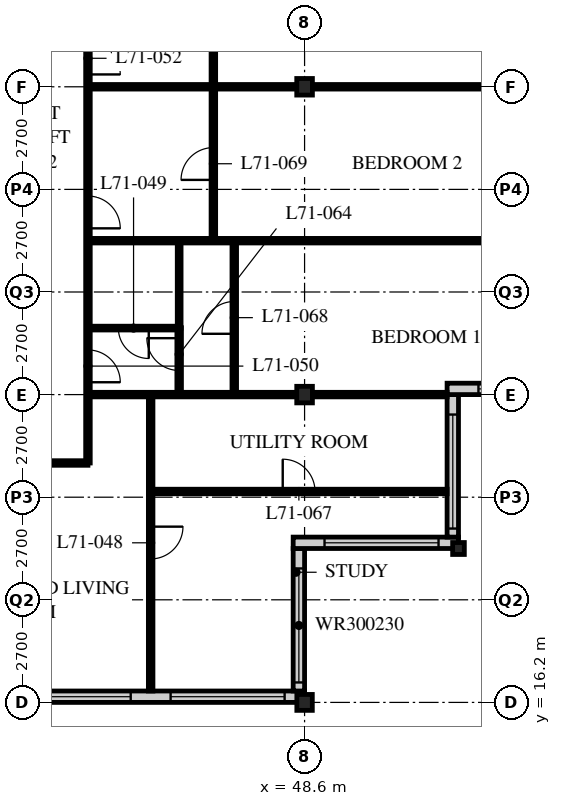
"""IFC4 building model, lengths in metres.
Left out: names, types, materials, properties, quantities, classifications, styles, units other than length and angle.
Written with IfcOpenShell. Run it as: python <this file> out.ifc"""

import sys

from ifc_helpers import new_model, si_unit, direction, frame, frame_2d, origin, origin_2d, place, context, subcontext, project, spatial, rectangle, i_section, extrude, element, fill, save


model = new_model("IFC4")
c1 = context("Model", 3, precision=1e-05, world=origin(), true_north=direction((0.0, 1.0)))
c2 = subcontext(c1, "Body", "Model", "MODEL_VIEW")
j1 = project(units=[si_unit("LENGTHUNIT", "METRE"), si_unit("PLANEANGLEUNIT", "RADIAN")], contexts=[c1])
p1 = place(None, origin())
s1 = spatial("IfcSite", under=j1, at=p1, CompositionType="ELEMENT")
p2 = place(p1, origin())
s2 = spatial("IfcBuilding", under=s1, at=p2, CompositionType="ELEMENT")
p3 = place(p2, frame((0.0, 0.0, 277.5)))
s3 = spatial("IfcBuildingStorey", under=s2, at=p3, CompositionType="ELEMENT", Elevation=277.5)
p4 = place(p3, frame((48.6, 16.2, 0.0), z_axis=(0.0, 0.0, 1.0), x_axis=(1.0, 0.0, 0.0)))
e1 = element("IfcColumn", 1, at=p4, inside=s3, PredefinedType="COLUMN", context=c2, shape_type="SweptSolid", body=[
    extrude(i_section(OverallWidth=0.407, OverallDepth=0.419, WebThickness=0.031, FlangeThickness=0.049, FilletRadius=0.015, at=origin_2d()), origin(), (0.0, 0.0, 1.0), 3.9),
])
for number, where, z_axis, x_axis in (
    (2, (48.6, 24.3, 0.0), (0.0, 0.0, 1.0), (1.0, 0.0, 0.0)),
    (3, (48.6, 32.4, 0.0), (0.0, 0.0, 1.0), (1.0, 0.0, 0.0)),
):
    element("IfcColumn", number, at=place(p3, frame(where, z_axis=z_axis, x_axis=x_axis)), inside=s3, PredefinedType="COLUMN", context=c2, shape_type="SweptSolid", body=[
        extrude(i_section(OverallWidth=0.412, OverallDepth=0.437, WebThickness=0.036, FlangeThickness=0.058, FilletRadius=0.015, at=origin_2d()), origin(), (0.0, 0.0, 1.0), 3.9),
    ])
p5 = place(p3, frame((52.65, 20.25, 0.0), z_axis=(0.0, 0.0, 1.0), x_axis=(1.0, 0.0, 0.0)))
e4 = element("IfcColumn", 4, at=p5, inside=s3, PredefinedType="COLUMN", context=c2, shape_type="SweptSolid", body=[
    extrude(i_section(OverallWidth=0.307, OverallDepth=0.314, WebThickness=0.012, FlangeThickness=0.019, FilletRadius=0.015, at=origin_2d()), origin(), (0.0, 0.0, 1.0), 3.9),
])
p6 = place(p3, frame((8.4, 16.35, 0.0), z_axis=(0.0, 0.0, 1.0), x_axis=(1.0, 0.0, 0.0)))
e5 = element("IfcWall", 5, at=p6, inside=s3, PredefinedType="SOLIDWALL", context=c2, shape_type="SweptSolid", body=[
    extrude(rectangle(XDim=40.2, YDim=0.3, at=frame_2d((20.1, 0.0))), origin(), (0.0, 0.0, 1.0), 3.69),
])
p7 = place(p6, frame((0.225, 0.0, 0.6)))
e6 = element("IfcOpeningElement", 6, at=p7, cuts=e5, PredefinedType="OPENING", context=c2, shape_type="SweptSolid", body=[
    extrude(rectangle(XDim=3.0, YDim=2.4, at=frame_2d((1.5, 1.2))), frame((0.0, 0.16, 0.0), z_axis=(0.0, -1.0, 0.0), x_axis=(1.0, 0.0, 0.0)), (0.0, 0.0, 1.0), 0.32),
])
p8 = place(p6, frame((4.275, 0.0, 0.6)))
e7 = element("IfcOpeningElement", 7, at=p8, cuts=e5, PredefinedType="OPENING", context=c2, shape_type="SweptSolid", body=[
    extrude(rectangle(XDim=3.0, YDim=2.4, at=frame_2d((1.5, 1.2))), frame((0.0, 0.16, 0.0), z_axis=(0.0, -1.0, 0.0), x_axis=(1.0, 0.0, 0.0)), (0.0, 0.0, 1.0), 0.32),
])
p9 = place(p6, frame((8.325, 0.0, 0.6)))
e8 = element("IfcOpeningElement", 8, at=p9, cuts=e5, PredefinedType="OPENING", context=c2, shape_type="SweptSolid", body=[
    extrude(rectangle(XDim=3.0, YDim=2.4, at=frame_2d((1.5, 1.2))), frame((0.0, 0.16, 0.0), z_axis=(0.0, -1.0, 0.0), x_axis=(1.0, 0.0, 0.0)), (0.0, 0.0, 1.0), 0.32),
])
p10 = place(p6, frame((12.375, 0.0, 0.6)))
e9 = element("IfcOpeningElement", 9, at=p10, cuts=e5, PredefinedType="OPENING", context=c2, shape_type="SweptSolid", body=[
    extrude(rectangle(XDim=3.0, YDim=2.4, at=frame_2d((1.5, 1.2))), frame((0.0, 0.16, 0.0), z_axis=(0.0, -1.0, 0.0), x_axis=(1.0, 0.0, 0.0)), (0.0, 0.0, 1.0), 0.32),
])
p11 = place(p6, frame((16.425, 0.0, 0.6)))
e10 = element("IfcOpeningElement", 10, at=p11, cuts=e5, PredefinedType="OPENING", context=c2, shape_type="SweptSolid", body=[
    extrude(rectangle(XDim=3.0, YDim=2.4, at=frame_2d((1.5, 1.2))), frame((0.0, 0.16, 0.0), z_axis=(0.0, -1.0, 0.0), x_axis=(1.0, 0.0, 0.0)), (0.0, 0.0, 1.0), 0.32),
])
p12 = place(p6, frame((20.475, 0.0, 0.6)))
e11 = element("IfcOpeningElement", 11, at=p12, cuts=e5, PredefinedType="OPENING", context=c2, shape_type="SweptSolid", body=[
    extrude(rectangle(XDim=3.0, YDim=2.4, at=frame_2d((1.5, 1.2))), frame((0.0, 0.16, 0.0), z_axis=(0.0, -1.0, 0.0), x_axis=(1.0, 0.0, 0.0)), (0.0, 0.0, 1.0), 0.32),
])
p13 = place(p6, frame((24.525, 0.0, 0.6)))
e12 = element("IfcOpeningElement", 12, at=p13, cuts=e5, PredefinedType="OPENING", context=c2, shape_type="SweptSolid", body=[
    extrude(rectangle(XDim=3.0, YDim=2.4, at=frame_2d((1.5, 1.2))), frame((0.0, 0.16, 0.0), z_axis=(0.0, -1.0, 0.0), x_axis=(1.0, 0.0, 0.0)), (0.0, 0.0, 1.0), 0.32),
])
p14 = place(p6, frame((28.575, 0.0, 0.6)))
e13 = element("IfcOpeningElement", 13, at=p14, cuts=e5, PredefinedType="OPENING", context=c2, shape_type="SweptSolid", body=[
    extrude(rectangle(XDim=3.0, YDim=2.4, at=frame_2d((1.5, 1.2))), frame((0.0, 0.16, 0.0), z_axis=(0.0, -1.0, 0.0), x_axis=(1.0, 0.0, 0.0)), (0.0, 0.0, 1.0), 0.32),
])
p15 = place(p6, frame((32.625, 0.0, 0.6)))
e14 = element("IfcOpeningElement", 14, at=p15, cuts=e5, PredefinedType="OPENING", context=c2, shape_type="SweptSolid", body=[
    extrude(rectangle(XDim=3.0, YDim=2.4, at=frame_2d((1.5, 1.2))), frame((0.0, 0.16, 0.0), z_axis=(0.0, -1.0, 0.0), x_axis=(1.0, 0.0, 0.0)), (0.0, 0.0, 1.0), 0.32),
])
p16 = place(p6, frame((36.675, 0.0, 0.6)))
e15 = element("IfcOpeningElement", 15, at=p16, cuts=e5, PredefinedType="OPENING", context=c2, shape_type="SweptSolid", body=[
    extrude(rectangle(XDim=3.0, YDim=2.4, at=frame_2d((1.5, 1.2))), frame((0.0, 0.16, 0.0), z_axis=(0.0, -1.0, 0.0), x_axis=(1.0, 0.0, 0.0)), (0.0, 0.0, 1.0), 0.32),
])
p17 = place(p3, frame((48.45, 16.5, 0.0), z_axis=(0.0, 0.0, 1.0), x_axis=(0.0, 1.0, 0.0)))
e16 = element("IfcWall", 16, at=p17, inside=s3, PredefinedType="SOLIDWALL", context=c2, shape_type="SweptSolid", body=[
    extrude(rectangle(XDim=3.75, YDim=0.3, at=frame_2d((1.875, 0.0))), origin(), (0.0, 0.0, 1.0), 3.69),
])
p18 = place(p17, frame((0.225, 0.0, 0.6)))
e17 = element("IfcOpeningElement", 17, at=p18, cuts=e16, PredefinedType="OPENING", context=c2, shape_type="SweptSolid", body=[
    extrude(rectangle(XDim=3.0, YDim=2.3, at=frame_2d((1.5, 1.15))), frame((0.0, 0.16, 0.0), z_axis=(0.0, -1.0, 0.0), x_axis=(1.0, 0.0, 0.0)), (0.0, 0.0, 1.0), 0.32),
])
p19 = place(p3, frame((48.3, 20.4, 0.0), z_axis=(0.0, 0.0, 1.0), x_axis=(1.0, 0.0, 0.0)))
e18 = element("IfcWall", 18, at=p19, inside=s3, PredefinedType="SOLIDWALL", context=c2, shape_type="SweptSolid", body=[
    extrude(rectangle(XDim=4.35, YDim=0.3, at=frame_2d((2.175, 0.0))), origin(), (0.0, 0.0, 1.0), 3.69),
])
p20 = place(p19, frame((0.825, 0.0, 0.6)))
e19 = element("IfcOpeningElement", 19, at=p20, cuts=e18, PredefinedType="OPENING", context=c2, shape_type="SweptSolid", body=[
    extrude(rectangle(XDim=3.0, YDim=2.3, at=frame_2d((1.5, 1.15))), frame((0.0, 0.16, 0.0), z_axis=(0.0, -1.0, 0.0), x_axis=(1.0, 0.0, 0.0)), (0.0, 0.0, 1.0), 0.32),
])
p21 = place(p3, frame((52.5, 20.55, 0.0), z_axis=(0.0, 0.0, 1.0), x_axis=(0.0, 1.0, 0.0)))
e20 = element("IfcWall", 20, at=p21, inside=s3, PredefinedType="SOLIDWALL", context=c2, shape_type="SweptSolid", body=[
    extrude(rectangle(XDim=3.75, YDim=0.3, at=frame_2d((1.875, 0.0))), origin(), (0.0, 0.0, 1.0), 3.69),
])
p22 = place(p21, frame((0.225, 0.0, 0.6)))
e21 = element("IfcOpeningElement", 21, at=p22, cuts=e20, PredefinedType="OPENING", context=c2, shape_type="SweptSolid", body=[
    extrude(rectangle(XDim=3.0, YDim=2.3, at=frame_2d((1.5, 1.15))), frame((0.0, 0.16, 0.0), z_axis=(0.0, -1.0, 0.0), x_axis=(1.0, 0.0, 0.0)), (0.0, 0.0, 1.0), 0.32),
])
p23 = place(p3, frame((52.35, 24.45, 0.0), z_axis=(0.0, 0.0, 1.0), x_axis=(1.0, 0.0, 0.0)))
e22 = element("IfcWall", 22, at=p23, inside=s3, PredefinedType="SOLIDWALL", context=c2, shape_type="SweptSolid", body=[
    extrude(rectangle(XDim=4.35, YDim=0.3, at=frame_2d((2.175, 0.0))), origin(), (0.0, 0.0, 1.0), 3.69),
])
p24 = place(p23, frame((0.825, 0.0, 0.6)))
e23 = element("IfcOpeningElement", 23, at=p24, cuts=e22, PredefinedType="OPENING", context=c2, shape_type="SweptSolid", body=[
    extrude(rectangle(XDim=3.0, YDim=2.3, at=frame_2d((1.5, 1.15))), frame((0.0, 0.16, 0.0), z_axis=(0.0, -1.0, 0.0), x_axis=(1.0, 0.0, 0.0)), (0.0, 0.0, 1.0), 0.32),
])
p25 = place(p3, frame((42.9, 22.5, 0.0), z_axis=(0.0, 0.0, 1.0), x_axis=(0.0, 1.0, 0.0)))
e24 = element("IfcWall", 24, at=p25, inside=s3, PredefinedType="PARTITIONING", context=c2, shape_type="SweptSolid", body=[
    extrude(rectangle(XDim=18.0, YDim=0.12, at=frame_2d((9.0, 0.0))), origin(), (0.0, 0.0, 1.0), 3.69),
])
p26 = place(p25, frame((2.125, 0.0, 0.0)))
e25 = element("IfcOpeningElement", 25, at=p26, cuts=e24, PredefinedType="OPENING", context=c2, shape_type="SweptSolid", body=[
    extrude(rectangle(XDim=0.85, YDim=2.1, at=frame_2d((0.425, 1.05))), frame((0.0, 0.07, 0.0), z_axis=(0.0, -1.0, 0.0), x_axis=(1.0, 0.0, 0.0)), (0.0, 0.0, 1.0), 0.14),
])
p27 = place(p25, frame((6.175, 0.0, 0.0)))
e26 = element("IfcOpeningElement", 26, at=p27, cuts=e24, PredefinedType="OPENING", context=c2, shape_type="SweptSolid", body=[
    extrude(rectangle(XDim=0.85, YDim=2.1, at=frame_2d((0.425, 1.05))), frame((0.0, 0.07, 0.0), z_axis=(0.0, -1.0, 0.0), x_axis=(1.0, 0.0, 0.0)), (0.0, 0.0, 1.0), 0.14),
])
p28 = place(p25, frame((10.225, 0.0, 0.0)))
e27 = element("IfcOpeningElement", 27, at=p28, cuts=e24, PredefinedType="OPENING", context=c2, shape_type="SweptSolid", body=[
    extrude(rectangle(XDim=0.85, YDim=2.1, at=frame_2d((0.425, 1.05))), frame((0.0, 0.07, 0.0), z_axis=(0.0, -1.0, 0.0), x_axis=(1.0, 0.0, 0.0)), (0.0, 0.0, 1.0), 0.14),
])
p29 = place(p25, frame((14.275, 0.0, 0.0)))
e28 = element("IfcOpeningElement", 28, at=p29, cuts=e24, PredefinedType="OPENING", context=c2, shape_type="SweptSolid", body=[
    extrude(rectangle(XDim=0.85, YDim=2.1, at=frame_2d((0.425, 1.05))), frame((0.0, 0.07, 0.0), z_axis=(0.0, -1.0, 0.0), x_axis=(1.0, 0.0, 0.0)), (0.0, 0.0, 1.0), 0.14),
])
p30 = place(p3, frame((36.45, 22.5, 0.0), z_axis=(0.0, 0.0, 1.0), x_axis=(1.0, 0.0, 0.0)))
e29 = element("IfcWall", 29, at=p30, inside=s3, PredefinedType="PARTITIONING", context=c2, shape_type="SweptSolid", body=[
    extrude(rectangle(XDim=6.45, YDim=0.12, at=frame_2d((3.225, 0.0))), origin(), (0.0, 0.0, 1.0), 3.69),
])
p31 = place(p30, frame((2.8, 0.0, 0.0)))
e30 = element("IfcOpeningElement", 30, at=p31, cuts=e29, PredefinedType="OPENING", context=c2, shape_type="SweptSolid", body=[
    extrude(rectangle(XDim=0.85, YDim=2.1, at=frame_2d((0.425, 1.05))), frame((0.0, 0.07, 0.0), z_axis=(0.0, -1.0, 0.0), x_axis=(1.0, 0.0, 0.0)), (0.0, 0.0, 1.0), 0.14),
])
p32 = place(p3, frame((42.9, 24.3, 0.0), z_axis=(0.0, 0.0, 1.0), x_axis=(1.0, 0.0, 0.0)))
e31 = element("IfcWall", 31, at=p32, inside=s3, PredefinedType="PARTITIONING", context=c2, shape_type="SweptSolid", body=[
    extrude(rectangle(XDim=9.45, YDim=0.12, at=frame_2d((4.725, 0.0))), origin(), (0.0, 0.0, 1.0), 3.078),
])
p33 = place(p3, frame((44.55, 16.5, 0.0), z_axis=(0.0, 0.0, 1.0), x_axis=(0.0, 1.0, 0.0)))
e32 = element("IfcWall", 32, at=p33, inside=s3, PredefinedType="PARTITIONING", context=c2, shape_type="SweptSolid", body=[
    extrude(rectangle(XDim=7.8, YDim=0.12, at=frame_2d((3.9, 0.0))), origin(), (0.0, 0.0, 1.0), 3.69),
])
p34 = place(p33, frame((3.475, 0.0, 0.0)))
e33 = element("IfcOpeningElement", 33, at=p34, cuts=e32, PredefinedType="OPENING", context=c2, shape_type="SweptSolid", body=[
    extrude(rectangle(XDim=0.85, YDim=2.1, at=frame_2d((0.425, 1.05))), frame((0.0, 0.07, 0.0), z_axis=(0.0, -1.0, 0.0), x_axis=(1.0, 0.0, 0.0)), (0.0, 0.0, 1.0), 0.14),
])
p35 = place(p3, frame((42.9, 26.05, 0.0), z_axis=(0.0, 0.0, 1.0), x_axis=(1.0, 0.0, 0.0)))
e34 = element("IfcWall", 34, at=p35, inside=s3, PredefinedType="PARTITIONING", context=c2, shape_type="SweptSolid", body=[
    extrude(rectangle(XDim=2.4, YDim=0.1, at=frame_2d((1.2, 0.0))), origin(), (0.0, 0.0, 1.0), 3.69),
])
p36 = place(p35, frame((0.8, 0.0, 0.0)))
e35 = element("IfcOpeningElement", 35, at=p36, cuts=e34, PredefinedType="OPENING", context=c2, shape_type="SweptSolid", body=[
    extrude(rectangle(XDim=0.8, YDim=2.1, at=frame_2d((0.4, 1.05))), frame((0.0, 0.06, 0.0), z_axis=(0.0, -1.0, 0.0), x_axis=(1.0, 0.0, 0.0)), (0.0, 0.0, 1.0), 0.12),
])
p37 = place(p3, frame((45.3, 26.05, 0.0), z_axis=(0.0, 0.0, 1.0), x_axis=(0.0, 1.0, 0.0)))
e36 = element("IfcWall", 36, at=p37, inside=s3, PredefinedType="PARTITIONING", context=c2, shape_type="SweptSolid", body=[
    extrude(rectangle(XDim=2.3, YDim=0.1, at=frame_2d((1.15, 0.0))), origin(), (0.0, 0.0, 1.0), 3.69),
])
p38 = place(p3, frame((42.9, 28.35, 0.0), z_axis=(0.0, 0.0, 1.0), x_axis=(1.0, 0.0, 0.0)))
e37 = element("IfcWall", 37, at=p38, inside=s3, PredefinedType="PARTITIONING", context=c2, shape_type="SweptSolid", body=[
    extrude(rectangle(XDim=13.5, YDim=0.12, at=frame_2d((6.75, 0.0))), origin(), (0.0, 0.0, 1.0), 3.69),
])
p39 = place(p3, frame((42.9, 32.4, 0.0), z_axis=(0.0, 0.0, 1.0), x_axis=(1.0, 0.0, 0.0)))
e38 = element("IfcWall", 38, at=p39, inside=s3, PredefinedType="PARTITIONING", context=c2, shape_type="SweptSolid", body=[
    extrude(rectangle(XDim=13.5, YDim=0.12, at=frame_2d((6.75, 0.0))), origin(), (0.0, 0.0, 1.0), 3.078),
])
p40 = place(p3, frame((45.3, 24.3, 0.0), z_axis=(0.0, 0.0, 1.0), x_axis=(0.0, 1.0, 0.0)))
e39 = element("IfcWall", 39, at=p40, inside=s3, PredefinedType="PARTITIONING", context=c2, shape_type="SweptSolid", body=[
    extrude(rectangle(XDim=1.76, YDim=0.12, at=frame_2d((0.88, 0.0))), origin(), (0.0, 0.0, 1.0), 3.69),
])
p41 = place(p40, frame((0.635, 0.0, 0.0)))
e40 = element("IfcOpeningElement", 40, at=p41, cuts=e39, PredefinedType="OPENING", context=c2, shape_type="SweptSolid", body=[
    extrude(rectangle(XDim=0.85, YDim=2.1, at=frame_2d((0.425, 1.05))), frame((0.0, 0.07, 0.0), z_axis=(0.0, -1.0, 0.0), x_axis=(1.0, 0.0, 0.0)), (0.0, 0.0, 1.0), 0.14),
])
p42 = place(p3, frame((44.55, 21.75, 0.0), z_axis=(0.0, 0.0, 1.0), x_axis=(1.0, 0.0, 0.0)))
e41 = element("IfcWall", 41, at=p42, inside=s3, PredefinedType="PARTITIONING", context=c2, shape_type="SweptSolid", body=[
    extrude(rectangle(XDim=7.8, YDim=0.12, at=frame_2d((3.9, 0.0))), origin(), (0.0, 0.0, 1.0), 3.69),
])
p43 = place(p42, frame((3.475, 0.0, 0.0)))
e42 = element("IfcOpeningElement", 42, at=p43, cuts=e41, PredefinedType="OPENING", context=c2, shape_type="SweptSolid", body=[
    extrude(rectangle(XDim=0.85, YDim=2.1, at=frame_2d((0.425, 1.05))), frame((0.0, 0.07, 0.0), z_axis=(0.0, -1.0, 0.0), x_axis=(1.0, 0.0, 0.0)), (0.0, 0.0, 1.0), 0.14),
])
p44 = place(p3, frame((46.75, 24.3, 0.0), z_axis=(0.0, 0.0, 1.0), x_axis=(0.0, 1.0, 0.0)))
e43 = element("IfcWall", 43, at=p44, inside=s3, PredefinedType="PARTITIONING", context=c2, shape_type="SweptSolid", body=[
    extrude(rectangle(XDim=4.05, YDim=0.12, at=frame_2d((2.025, 0.0))), origin(), (0.0, 0.0, 1.0), 3.69),
])
p45 = place(p44, frame((1.6, 0.0, 0.0)))
e44 = element("IfcOpeningElement", 44, at=p45, cuts=e43, PredefinedType="OPENING", context=c2, shape_type="SweptSolid", body=[
    extrude(rectangle(XDim=0.85, YDim=2.1, at=frame_2d((0.425, 1.05))), frame((0.0, 0.07, 0.0), z_axis=(0.0, -1.0, 0.0), x_axis=(1.0, 0.0, 0.0)), (0.0, 0.0, 1.0), 0.14),
])
p46 = place(p3, frame((46.2, 28.35, 0.0), z_axis=(0.0, 0.0, 1.0), x_axis=(0.0, 1.0, 0.0)))
e45 = element("IfcWall", 45, at=p46, inside=s3, PredefinedType="PARTITIONING", context=c2, shape_type="SweptSolid", body=[
    extrude(rectangle(XDim=16.2, YDim=0.12, at=frame_2d((8.1, 0.0))), origin(), (0.0, 0.0, 1.0), 3.69),
])
p47 = place(p46, frame((1.6, 0.0, 0.0)))
e46 = element("IfcOpeningElement", 46, at=p47, cuts=e45, PredefinedType="OPENING", context=c2, shape_type="SweptSolid", body=[
    extrude(rectangle(XDim=0.85, YDim=2.1, at=frame_2d((0.425, 1.05))), frame((0.0, 0.07, 0.0), z_axis=(0.0, -1.0, 0.0), x_axis=(1.0, 0.0, 0.0)), (0.0, 0.0, 1.0), 0.14),
])
p48 = place(p46, frame((5.65, 0.0, 0.0)))
e47 = element("IfcOpeningElement", 47, at=p48, cuts=e45, PredefinedType="OPENING", context=c2, shape_type="SweptSolid", body=[
    extrude(rectangle(XDim=0.85, YDim=2.1, at=frame_2d((0.425, 1.05))), frame((0.0, 0.07, 0.0), z_axis=(0.0, -1.0, 0.0), x_axis=(1.0, 0.0, 0.0)), (0.0, 0.0, 1.0), 0.14),
])
p49 = place(p46, frame((9.7, 0.0, 0.0)))
e48 = element("IfcOpeningElement", 48, at=p49, cuts=e45, PredefinedType="OPENING", context=c2, shape_type="SweptSolid", body=[
    extrude(rectangle(XDim=0.85, YDim=2.1, at=frame_2d((0.425, 1.05))), frame((0.0, 0.07, 0.0), z_axis=(0.0, -1.0, 0.0), x_axis=(1.0, 0.0, 0.0)), (0.0, 0.0, 1.0), 0.14),
])
p50 = place(p46, frame((13.75, 0.0, 0.0)))
e49 = element("IfcOpeningElement", 49, at=p50, cuts=e45, PredefinedType="OPENING", context=c2, shape_type="SweptSolid", body=[
    extrude(rectangle(XDim=0.85, YDim=2.1, at=frame_2d((0.425, 1.05))), frame((0.0, 0.07, 0.0), z_axis=(0.0, -1.0, 0.0), x_axis=(1.0, 0.0, 0.0)), (0.0, 0.0, 1.0), 0.14),
])
p51 = place(p15, origin())
e50 = element("IfcWindow", 50, at=p51, inside=s3, PartitioningType="SINGLE_PANEL", PredefinedType="WINDOW", context=c2, shape_type="SweptSolid", body=[
    extrude(rectangle(XDim=3.0, YDim=2.4, at=frame_2d((1.5, 1.2))), frame((0.0, 0.03, 0.0), z_axis=(0.0, -1.0, 0.0), x_axis=(1.0, 0.0, 0.0)), (0.0, 0.0, 1.0), 0.06),
])
fill(e14, e50)
p52 = place(p16, origin())
e51 = element("IfcWindow", 51, at=p52, inside=s3, PartitioningType="SINGLE_PANEL", PredefinedType="WINDOW", context=c2, shape_type="SweptSolid", body=[
    extrude(rectangle(XDim=3.0, YDim=2.4, at=frame_2d((1.5, 1.2))), frame((0.0, 0.03, 0.0), z_axis=(0.0, -1.0, 0.0), x_axis=(1.0, 0.0, 0.0)), (0.0, 0.0, 1.0), 0.06),
])
fill(e15, e51)
p53 = place(p18, origin())
e52 = element("IfcWindow", 52, at=p53, inside=s3, PartitioningType="SINGLE_PANEL", PredefinedType="WINDOW", context=c2, shape_type="SweptSolid", body=[
    extrude(rectangle(XDim=3.0, YDim=2.3, at=frame_2d((1.5, 1.15))), frame((0.0, 0.03, 0.0), z_axis=(0.0, -1.0, 0.0), x_axis=(1.0, 0.0, 0.0)), (0.0, 0.0, 1.0), 0.06),
])
fill(e17, e52)
p54 = place(p20, origin())
e53 = element("IfcWindow", 53, at=p54, inside=s3, PartitioningType="SINGLE_PANEL", PredefinedType="WINDOW", context=c2, shape_type="SweptSolid", body=[
    extrude(rectangle(XDim=3.0, YDim=2.3, at=frame_2d((1.5, 1.15))), frame((0.0, 0.03, 0.0), z_axis=(0.0, -1.0, 0.0), x_axis=(1.0, 0.0, 0.0)), (0.0, 0.0, 1.0), 0.06),
])
fill(e19, e53)
p55 = place(p22, origin())
e54 = element("IfcWindow", 54, at=p55, inside=s3, PartitioningType="SINGLE_PANEL", PredefinedType="WINDOW", context=c2, shape_type="SweptSolid", body=[
    extrude(rectangle(XDim=3.0, YDim=2.3, at=frame_2d((1.5, 1.15))), frame((0.0, 0.03, 0.0), z_axis=(0.0, -1.0, 0.0), x_axis=(1.0, 0.0, 0.0)), (0.0, 0.0, 1.0), 0.06),
])
fill(e21, e54)
p56 = place(p24, origin())
e55 = element("IfcWindow", 55, at=p56, inside=s3, PartitioningType="SINGLE_PANEL", PredefinedType="WINDOW", context=c2, shape_type="SweptSolid", body=[
    extrude(rectangle(XDim=3.0, YDim=2.3, at=frame_2d((1.5, 1.15))), frame((0.0, 0.03, 0.0), z_axis=(0.0, -1.0, 0.0), x_axis=(1.0, 0.0, 0.0)), (0.0, 0.0, 1.0), 0.06),
])
fill(e23, e55)
p57 = place(p34, origin())
e56 = element("IfcDoor", 56, at=p57, inside=s3, OperationType="SINGLE_SWING_LEFT", PredefinedType="DOOR", context=c2, shape_type="SweptSolid", body=[
    extrude(rectangle(XDim=0.85, YDim=2.1, at=frame_2d((0.425, 1.05))), frame((0.0, 0.025, 0.0), z_axis=(0.0, -1.0, 0.0), x_axis=(1.0, 0.0, 0.0)), (0.0, 0.0, 1.0), 0.05),
])
fill(e33, e56)
p58 = place(p36, origin())
e57 = element("IfcDoor", 57, at=p58, inside=s3, OperationType="SINGLE_SWING_LEFT", PredefinedType="DOOR", context=c2, shape_type="SweptSolid", body=[
    extrude(rectangle(XDim=0.8, YDim=2.1, at=frame_2d((0.4, 1.05))), frame((0.0, 0.025, 0.0), z_axis=(0.0, -1.0, 0.0), x_axis=(1.0, 0.0, 0.0)), (0.0, 0.0, 1.0), 0.05),
])
fill(e35, e57)
p59 = place(p26, origin())
e58 = element("IfcDoor", 58, at=p59, inside=s3, OperationType="SINGLE_SWING_RIGHT", PredefinedType="DOOR", context=c2, shape_type="SweptSolid", body=[
    extrude(rectangle(XDim=0.85, YDim=2.1, at=frame_2d((0.425, 1.05))), frame((0.0, 0.025, 0.0), z_axis=(0.0, -1.0, 0.0), x_axis=(1.0, 0.0, 0.0)), (0.0, 0.0, 1.0), 0.05),
])
fill(e25, e58)
p60 = place(p27, origin())
e59 = element("IfcDoor", 59, at=p60, inside=s3, OperationType="SINGLE_SWING_RIGHT", PredefinedType="DOOR", context=c2, shape_type="SweptSolid", body=[
    extrude(rectangle(XDim=0.85, YDim=2.1, at=frame_2d((0.425, 1.05))), frame((0.0, 0.025, 0.0), z_axis=(0.0, -1.0, 0.0), x_axis=(1.0, 0.0, 0.0)), (0.0, 0.0, 1.0), 0.05),
])
fill(e26, e59)
p61 = place(p28, origin())
e60 = element("IfcDoor", 60, at=p61, inside=s3, OperationType="SINGLE_SWING_RIGHT", PredefinedType="DOOR", context=c2, shape_type="SweptSolid", body=[
    extrude(rectangle(XDim=0.85, YDim=2.1, at=frame_2d((0.425, 1.05))), frame((0.0, 0.025, 0.0), z_axis=(0.0, -1.0, 0.0), x_axis=(1.0, 0.0, 0.0)), (0.0, 0.0, 1.0), 0.05),
])
fill(e27, e60)
p62 = place(p41, origin())
e61 = element("IfcDoor", 61, at=p62, inside=s3, OperationType="SINGLE_SWING_RIGHT", PredefinedType="DOOR", context=c2, shape_type="SweptSolid", body=[
    extrude(rectangle(XDim=0.85, YDim=2.1, at=frame_2d((0.425, 1.05))), frame((0.0, 0.025, 0.0), z_axis=(0.0, -1.0, 0.0), x_axis=(1.0, 0.0, 0.0)), (0.0, 0.0, 1.0), 0.05),
])
fill(e40, e61)
p63 = place(p43, origin())
e62 = element("IfcDoor", 62, at=p63, inside=s3, OperationType="SINGLE_SWING_LEFT", PredefinedType="DOOR", context=c2, shape_type="SweptSolid", body=[
    extrude(rectangle(XDim=0.85, YDim=2.1, at=frame_2d((0.425, 1.05))), frame((0.0, 0.025, 0.0), z_axis=(0.0, -1.0, 0.0), x_axis=(1.0, 0.0, 0.0)), (0.0, 0.0, 1.0), 0.05),
])
fill(e42, e62)
p64 = place(p45, origin())
e63 = element("IfcDoor", 63, at=p64, inside=s3, OperationType="SINGLE_SWING_LEFT", PredefinedType="DOOR", context=c2, shape_type="SweptSolid", body=[
    extrude(rectangle(XDim=0.85, YDim=2.1, at=frame_2d((0.425, 1.05))), frame((0.0, 0.025, 0.0), z_axis=(0.0, -1.0, 0.0), x_axis=(1.0, 0.0, 0.0)), (0.0, 0.0, 1.0), 0.05),
])
fill(e44, e63)
p65 = place(p47, origin())
e64 = element("IfcDoor", 64, at=p65, inside=s3, OperationType="SINGLE_SWING_LEFT", PredefinedType="DOOR", context=c2, shape_type="SweptSolid", body=[
    extrude(rectangle(XDim=0.85, YDim=2.1, at=frame_2d((0.425, 1.05))), frame((0.0, 0.025, 0.0), z_axis=(0.0, -1.0, 0.0), x_axis=(1.0, 0.0, 0.0)), (0.0, 0.0, 1.0), 0.05),
])
fill(e46, e64)
save(model, sys.argv[1])
